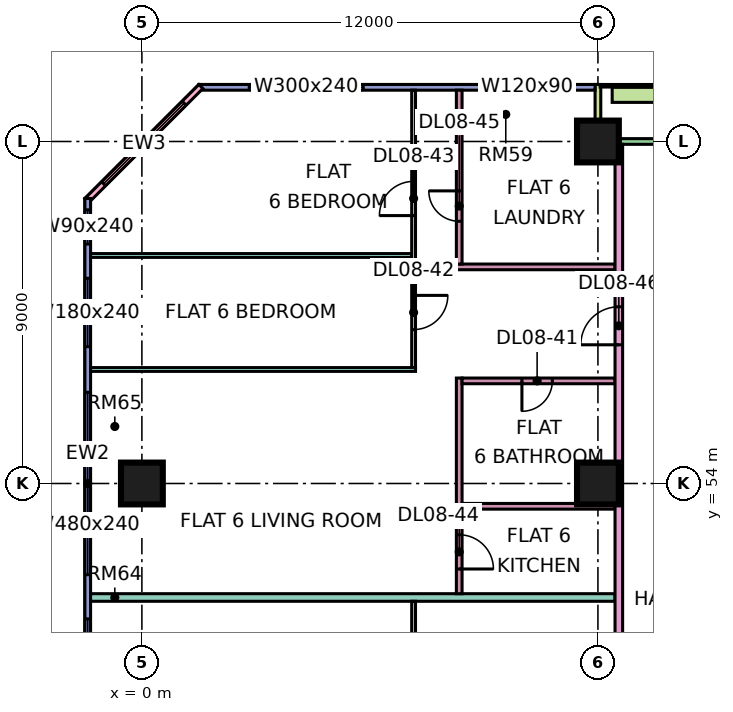
"""IFC4 building model, lengths in metres.
Left out: names, types, materials, properties, quantities, classifications, styles, units other than length and angle.
Written with IfcOpenShell. Run it as: python <this file> out.ifc"""

import sys

from ifc_helpers import new_model, si_unit, direction, frame, frame_2d, origin, origin_2d, place, context, subcontext, project, spatial, rectangle, extrude, element, fill, save


model = new_model("IFC4")
c1 = context("Model", 3, precision=1e-05, world=origin(), true_north=direction((0.0, 1.0)))
c2 = subcontext(c1, "Body", "Model", "MODEL_VIEW")
j1 = project(units=[si_unit("LENGTHUNIT", "METRE"), si_unit("PLANEANGLEUNIT", "RADIAN")], contexts=[c1])
p1 = place(None, origin())
s1 = spatial("IfcSite", under=j1, at=p1, CompositionType="ELEMENT")
p2 = place(p1, origin())
s2 = spatial("IfcBuilding", under=s1, at=p2, CompositionType="ELEMENT")
p3 = place(p2, frame((0.0, 0.0, 45.15)))
s3 = spatial("IfcBuildingStorey", under=s2, at=p3, CompositionType="ELEMENT", Elevation=45.15)
for number, where, z_axis, x_axis in (
    (1, (0.0, 54.0, 0.0), (0.0, 0.0, 1.0), (1.0, 0.0, 0.0)),
    (2, (12.0, 54.0, 0.0), (0.0, 0.0, 1.0), (1.0, 0.0, 0.0)),
    (3, (12.0, 63.0, 0.0), (0.0, 0.0, 1.0), (1.0, 0.0, 0.0)),
):
    element("IfcColumn", number, at=place(p3, frame(where, z_axis=z_axis, x_axis=x_axis)), inside=s3, PredefinedType="COLUMN", context=c2, shape_type="SweptSolid", body=[
        extrude(rectangle(XDim=1.1, YDim=1.1, at=origin_2d()), origin(), (0.0, 0.0, 1.0), 3.75),
    ])
p4 = place(p3, frame((22.425, 63.0, 0.0), z_axis=(0.0, 0.0, 1.0), x_axis=(-1.0, 0.0, 0.0)))
e4 = element("IfcWall", 4, at=p4, inside=s3, PredefinedType="SOLIDWALL", context=c2, shape_type="SweptSolid", body=[
    extrude(rectangle(XDim=10.35, YDim=0.15, at=frame_2d((5.175, 0.0))), origin(), (0.0, 0.0, 1.0), 3.35),
])
p5 = place(p4, frame((0.562, 0.0, 0.45)))
e5 = element("IfcOpeningElement", 5, at=p5, cuts=e4, PredefinedType="OPENING", context=c2, shape_type="SweptSolid", body=[
    extrude(rectangle(XDim=1.2, YDim=2.4, at=frame_2d((0.6, 1.2))), frame((0.0, 0.085, 0.0), z_axis=(0.0, -1.0, 0.0), x_axis=(1.0, 0.0, 0.0)), (0.0, 0.0, 1.0), 0.17),
])
p6 = place(p4, frame((3.975, 0.0, 0.45)))
e6 = element("IfcOpeningElement", 6, at=p6, cuts=e4, PredefinedType="OPENING", context=c2, shape_type="SweptSolid", body=[
    extrude(rectangle(XDim=2.4, YDim=2.4, at=frame_2d((1.2, 1.2))), frame((0.0, 0.085, 0.0), z_axis=(0.0, -1.0, 0.0), x_axis=(1.0, 0.0, 0.0)), (0.0, 0.0, 1.0), 0.17),
])
p7 = place(p3, frame((12.0, 64.5, 0.0), z_axis=(0.0, 0.0, 1.0), x_axis=(0.0, -1.0, 0.0)))
e7 = element("IfcWall", 7, at=p7, inside=s3, PredefinedType="SOLIDWALL", context=c2, shape_type="SweptSolid", body=[
    extrude(rectangle(XDim=1.5, YDim=0.15, at=frame_2d((0.75, 0.0))), origin(), (0.0, 0.0, 1.0), 3.35),
])
p8 = place(p3, frame((11.925, 64.425, 0.0), z_axis=(0.0, 0.0, 1.0), x_axis=(-1.0, 0.0, 0.0)))
e8 = element("IfcWall", 8, at=p8, inside=s3, PredefinedType="SOLIDWALL", context=c2, shape_type="SweptSolid", body=[
    extrude(rectangle(XDim=10.425, YDim=0.15, at=frame_2d((5.212, 0.0))), origin(), (0.0, 0.0, 1.0), 3.35),
])
p9 = place(p8, frame((1.188, 0.0, 1.7)))
e9 = element("IfcOpeningElement", 9, at=p9, cuts=e8, PredefinedType="OPENING", context=c2, shape_type="SweptSolid", body=[
    extrude(rectangle(XDim=1.2, YDim=0.9, at=frame_2d((0.6, 0.45))), frame((0.0, 0.085, 0.0), z_axis=(0.0, -1.0, 0.0), x_axis=(1.0, 0.0, 0.0)), (0.0, 0.0, 1.0), 0.17),
])
p10 = place(p8, frame((6.1, 0.0, 0.45)))
e10 = element("IfcOpeningElement", 10, at=p10, cuts=e8, PredefinedType="OPENING", context=c2, shape_type="SweptSolid", body=[
    extrude(rectangle(XDim=3.0, YDim=2.4, at=frame_2d((1.5, 1.2))), frame((0.0, 0.085, 0.0), z_axis=(0.0, -1.0, 0.0), x_axis=(1.0, 0.0, 0.0)), (0.0, 0.0, 1.0), 0.17),
])
p11 = place(p3, frame((1.553, 64.447, 0.0), z_axis=(0.0, 0.0, 1.0), x_axis=(-0.707106781187, -0.707106781187, 0.0)))
e11 = element("IfcWall", 11, at=p11, inside=s3, PredefinedType="SOLIDWALL", context=c2, shape_type="SweptSolid", body=[
    extrude(rectangle(XDim=4.243, YDim=0.15, at=frame_2d((2.121, 0.0))), origin(), (0.0, 0.0, 1.0), 3.35),
])
p12 = place(p11, frame((0.621, 0.0, 0.45)))
e12 = element("IfcOpeningElement", 12, at=p12, cuts=e11, PredefinedType="OPENING", context=c2, shape_type="SweptSolid", body=[
    extrude(rectangle(XDim=3.0, YDim=2.4, at=frame_2d((1.5, 1.2))), frame((0.0, 0.085, 0.0), z_axis=(0.0, -1.0, 0.0), x_axis=(1.0, 0.0, 0.0)), (0.0, 0.0, 1.0), 0.17),
])
p13 = place(p3, frame((-1.425, 61.5, 0.0), z_axis=(0.0, 0.0, 1.0), x_axis=(0.0, -1.0, 0.0)))
e13 = element("IfcWall", 13, at=p13, inside=s3, PredefinedType="SOLIDWALL", context=c2, shape_type="SweptSolid", body=[
    extrude(rectangle(XDim=13.425, YDim=0.15, at=frame_2d((6.712, 0.0))), origin(), (0.0, 0.0, 1.0), 3.35),
])
p14 = place(p13, frame((0.3, 0.0, 0.45)))
e14 = element("IfcOpeningElement", 14, at=p14, cuts=e13, PredefinedType="OPENING", context=c2, shape_type="SweptSolid", body=[
    extrude(rectangle(XDim=0.9, YDim=2.4, at=frame_2d((0.45, 1.2))), frame((0.0, 0.085, 0.0), z_axis=(0.0, -1.0, 0.0), x_axis=(1.0, 0.0, 0.0)), (0.0, 0.0, 1.0), 0.17),
])
p15 = place(p13, frame((2.1, 0.0, 0.45)))
e15 = element("IfcOpeningElement", 15, at=p15, cuts=e13, PredefinedType="OPENING", context=c2, shape_type="SweptSolid", body=[
    extrude(rectangle(XDim=1.8, YDim=2.4, at=frame_2d((0.9, 1.2))), frame((0.0, 0.085, 0.0), z_axis=(0.0, -1.0, 0.0), x_axis=(1.0, 0.0, 0.0)), (0.0, 0.0, 1.0), 0.17),
])
p16 = place(p13, frame((5.1, 0.0, 0.45)))
e16 = element("IfcOpeningElement", 16, at=p16, cuts=e13, PredefinedType="OPENING", context=c2, shape_type="SweptSolid", body=[
    extrude(rectangle(XDim=4.8, YDim=2.4, at=frame_2d((2.4, 1.2))), frame((0.0, 0.085, 0.0), z_axis=(0.0, -1.0, 0.0), x_axis=(1.0, 0.0, 0.0)), (0.0, 0.0, 1.0), 0.17),
])
p17 = place(p13, frame((11.062, 0.0, 0.45)))
e17 = element("IfcOpeningElement", 17, at=p17, cuts=e13, PredefinedType="OPENING", context=c2, shape_type="SweptSolid", body=[
    extrude(rectangle(XDim=1.8, YDim=2.4, at=frame_2d((0.9, 1.2))), frame((0.0, 0.085, 0.0), z_axis=(0.0, -1.0, 0.0), x_axis=(1.0, 0.0, 0.0)), (0.0, 0.0, 1.0), 0.17),
])
p18 = place(p3, frame((22.125, 64.229, 0.0), z_axis=(0.0, 0.0, 1.0), x_axis=(-1.0, 0.0, 0.0)))
e18 = element("IfcWall", 18, at=p18, inside=s3, PredefinedType="SOLIDWALL", context=c2, shape_type="SweptSolid", body=[
    extrude(rectangle(XDim=9.75, YDim=0.4, at=frame_2d((4.875, 0.0))), origin(), (0.0, 0.0, 1.0), 0.7),
])
p19 = place(p3, frame((-1.351, 60.0, 0.0), z_axis=(0.0, 0.0, 1.0), x_axis=(1.0, 0.0, 0.0)))
e19 = element("IfcWall", 19, at=p19, inside=s3, PredefinedType="PARTITIONING", context=c2, shape_type="SweptSolid", body=[
    extrude(rectangle(XDim=8.451, YDim=0.1, at=frame_2d((4.226, 0.0))), origin(), (0.0, 0.0, 1.0), 3.35),
])
p20 = place(p3, frame((-1.35, 51.0, 0.0), z_axis=(0.0, 0.0, 1.0), x_axis=(1.0, 0.0, 0.0)))
e20 = element("IfcWall", 20, at=p20, inside=s3, PredefinedType="PARTITIONING", context=c2, shape_type="SweptSolid", body=[
    extrude(rectangle(XDim=13.8, YDim=0.2, at=frame_2d((6.9, 0.0))), origin(), (0.0, 0.0, 1.0), 3.35),
])
p21 = place(p3, frame((-1.35, 57.0, 0.0), z_axis=(0.0, 0.0, 1.0), x_axis=(1.0, 0.0, 0.0)))
e21 = element("IfcWall", 21, at=p21, inside=s3, PredefinedType="PARTITIONING", context=c2, shape_type="SweptSolid", body=[
    extrude(rectangle(XDim=8.55, YDim=0.1, at=frame_2d((4.275, 0.0))), origin(), (0.0, 0.0, 1.0), 3.35),
])
p22 = place(p3, frame((7.15, 47.45, 0.0), z_axis=(0.0, 0.0, 1.0), x_axis=(0.0, 1.0, 0.0)))
e22 = element("IfcWall", 22, at=p22, inside=s3, PredefinedType="PARTITIONING", context=c2, shape_type="SweptSolid", body=[
    extrude(rectangle(XDim=3.45, YDim=0.1, at=frame_2d((1.725, 0.0))), origin(), (0.0, 0.0, 1.0), 3.35),
])
p23 = place(p3, frame((7.15, 57.05, 0.0), z_axis=(0.0, 0.0, 1.0), x_axis=(0.0, 1.0, 0.0)))
e23 = element("IfcWall", 23, at=p23, inside=s3, PredefinedType="PARTITIONING", context=c2, shape_type="SweptSolid", body=[
    extrude(rectangle(XDim=7.3, YDim=0.1, at=frame_2d((3.65, 0.0))), origin(), (0.0, 0.0, 1.0), 3.35),
])
p24 = place(p23, frame((1.0, 0.0, 0.0)))
e24 = element("IfcOpeningElement", 24, at=p24, cuts=e23, PredefinedType="OPENING", context=c2, shape_type="SweptSolid", body=[
    extrude(rectangle(XDim=0.9, YDim=2.1, at=frame_2d((0.45, 1.05))), frame((0.0, 0.06, 0.0), z_axis=(0.0, -1.0, 0.0), x_axis=(1.0, 0.0, 0.0)), (0.0, 0.0, 1.0), 0.12),
])
p25 = place(p23, frame((4.0, 0.0, 0.0)))
e25 = element("IfcOpeningElement", 25, at=p25, cuts=e23, PredefinedType="OPENING", context=c2, shape_type="SweptSolid", body=[
    extrude(rectangle(XDim=0.9, YDim=2.1, at=frame_2d((0.45, 1.05))), frame((0.0, 0.06, 0.0), z_axis=(0.0, -1.0, 0.0), x_axis=(1.0, 0.0, 0.0)), (0.0, 0.0, 1.0), 0.12),
])
p26 = place(p3, frame((8.275, 59.7, 0.0), z_axis=(0.0, 0.0, 1.0), x_axis=(1.0, 0.0, 0.0)))
e26 = element("IfcWall", 26, at=p26, inside=s3, PredefinedType="PARTITIONING", context=c2, shape_type="SweptSolid", body=[
    extrude(rectangle(XDim=4.175, YDim=0.15, at=frame_2d((2.087, 0.0))), origin(), (0.0, 0.0, 1.0), 3.35),
])
p27 = place(p3, frame((8.35, 51.1, 0.0), z_axis=(0.0, 0.0, 1.0), x_axis=(0.0, 1.0, 0.0)))
e27 = element("IfcWall", 27, at=p27, inside=s3, PredefinedType="PARTITIONING", context=c2, shape_type="SweptSolid", body=[
    extrude(rectangle(XDim=5.675, YDim=0.15, at=frame_2d((2.837, 0.0))), origin(), (0.0, 0.0, 1.0), 3.35),
])
p28 = place(p27, frame((0.65, 0.0, 0.0)))
e28 = element("IfcOpeningElement", 28, at=p28, cuts=e27, PredefinedType="OPENING", context=c2, shape_type="SweptSolid", body=[
    extrude(rectangle(XDim=0.9, YDim=2.1, at=frame_2d((0.45, 1.05))), frame((0.0, 0.085, 0.0), z_axis=(0.0, -1.0, 0.0), x_axis=(1.0, 0.0, 0.0)), (0.0, 0.0, 1.0), 0.17),
])
p29 = place(p3, frame((8.35, 59.775, 0.0), z_axis=(0.0, 0.0, 1.0), x_axis=(0.0, 1.0, 0.0)))
e29 = element("IfcWall", 29, at=p29, inside=s3, PredefinedType="PARTITIONING", context=c2, shape_type="SweptSolid", body=[
    extrude(rectangle(XDim=4.575, YDim=0.15, at=frame_2d((2.288, 0.0))), origin(), (0.0, 0.0, 1.0), 3.35),
])
p30 = place(p29, frame((1.125, 0.0, 0.0)))
e30 = element("IfcOpeningElement", 30, at=p30, cuts=e29, PredefinedType="OPENING", context=c2, shape_type="SweptSolid", body=[
    extrude(rectangle(XDim=0.8, YDim=2.1, at=frame_2d((0.4, 1.05))), frame((0.0, 0.085, 0.0), z_axis=(0.0, -1.0, 0.0), x_axis=(1.0, 0.0, 0.0)), (0.0, 0.0, 1.0), 0.17),
])
p31 = place(p3, frame((8.425, 53.4, 0.0), z_axis=(0.0, 0.0, 1.0), x_axis=(1.0, 0.0, 0.0)))
e31 = element("IfcWall", 31, at=p31, inside=s3, PredefinedType="PARTITIONING", context=c2, shape_type="SweptSolid", body=[
    extrude(rectangle(XDim=4.025, YDim=0.15, at=frame_2d((2.012, 0.0))), origin(), (0.0, 0.0, 1.0), 3.35),
])
p32 = place(p3, frame((8.425, 56.7, 0.0), z_axis=(0.0, 0.0, 1.0), x_axis=(1.0, 0.0, 0.0)))
e32 = element("IfcWall", 32, at=p32, inside=s3, PredefinedType="PARTITIONING", context=c2, shape_type="SweptSolid", body=[
    extrude(rectangle(XDim=4.025, YDim=0.15, at=frame_2d((2.012, 0.0))), origin(), (0.0, 0.0, 1.0), 3.35),
])
p33 = place(p32, frame((1.575, 0.0, 0.0)))
e33 = element("IfcOpeningElement", 33, at=p33, cuts=e32, PredefinedType="OPENING", context=c2, shape_type="SweptSolid", body=[
    extrude(rectangle(XDim=0.8, YDim=2.1, at=frame_2d((0.4, 1.05))), frame((0.0, 0.085, 0.0), z_axis=(0.0, -1.0, 0.0), x_axis=(1.0, 0.0, 0.0)), (0.0, 0.0, 1.0), 0.17),
])
p34 = place(p3, frame((12.55, 20.0, 0.0), z_axis=(0.0, 0.0, 1.0), x_axis=(0.0, 1.0, 0.0)))
e34 = element("IfcWall", 34, at=p34, inside=s3, PredefinedType="PARTITIONING", context=c2, shape_type="SweptSolid", body=[
    extrude(rectangle(XDim=42.926, YDim=0.2, at=frame_2d((21.463, 0.0))), origin(), (0.0, 0.0, 1.0), 3.35),
])
p35 = place(p34, frame((25.8, 0.0, 0.0)))
e35 = element("IfcOpeningElement", 35, at=p35, cuts=e34, PredefinedType="OPENING", context=c2, shape_type="SweptSolid", body=[
    extrude(rectangle(XDim=1.0, YDim=2.1, at=frame_2d((0.5, 1.05))), frame((0.0, 0.11, 0.0), z_axis=(0.0, -1.0, 0.0), x_axis=(1.0, 0.0, 0.0)), (0.0, 0.0, 1.0), 0.22),
])
p36 = place(p34, frame((37.65, 0.0, 0.0)))
e36 = element("IfcOpeningElement", 36, at=p36, cuts=e34, PredefinedType="OPENING", context=c2, shape_type="SweptSolid", body=[
    extrude(rectangle(XDim=1.0, YDim=2.1, at=frame_2d((0.5, 1.05))), frame((0.0, 0.11, 0.0), z_axis=(0.0, -1.0, 0.0), x_axis=(1.0, 0.0, 0.0)), (0.0, 0.0, 1.0), 0.22),
])
p37 = place(p34, frame((0.6, 0.0, 0.0)))
e37 = element("IfcOpeningElement", 37, at=p37, cuts=e34, PredefinedType="OPENING", context=c2, shape_type="SweptSolid", body=[
    extrude(rectangle(XDim=1.2, YDim=2.1, at=frame_2d((0.6, 1.05))), frame((0.0, 0.11, 0.0), z_axis=(0.0, -1.0, 0.0), x_axis=(1.0, 0.0, 0.0)), (0.0, 0.0, 1.0), 0.22),
])
p38 = place(p34, frame((4.65, 0.0, 0.0)))
e38 = element("IfcOpeningElement", 38, at=p38, cuts=e34, PredefinedType="OPENING", context=c2, shape_type="SweptSolid", body=[
    extrude(rectangle(XDim=1.0, YDim=2.1, at=frame_2d((0.5, 1.05))), frame((0.0, 0.11, 0.0), z_axis=(0.0, -1.0, 0.0), x_axis=(1.0, 0.0, 0.0)), (0.0, 0.0, 1.0), 0.22),
])
p39 = place(p9, origin())
e39 = element("IfcWindow", 39, at=p39, inside=s3, PartitioningType="SINGLE_PANEL", PredefinedType="WINDOW", context=c2, shape_type="SweptSolid", body=[
    extrude(rectangle(XDim=1.2, YDim=0.9, at=frame_2d((0.6, 0.45))), frame((0.0, 0.03, 0.0), z_axis=(0.0, -1.0, 0.0), x_axis=(1.0, 0.0, 0.0)), (0.0, 0.0, 1.0), 0.06),
])
fill(e9, e39)
p40 = place(p10, origin())
e40 = element("IfcWindow", 40, at=p40, inside=s3, PartitioningType="SINGLE_PANEL", PredefinedType="WINDOW", context=c2, shape_type="SweptSolid", body=[
    extrude(rectangle(XDim=3.0, YDim=2.4, at=frame_2d((1.5, 1.2))), frame((0.0, 0.03, 0.0), z_axis=(0.0, -1.0, 0.0), x_axis=(1.0, 0.0, 0.0)), (0.0, 0.0, 1.0), 0.06),
])
fill(e10, e40)
p41 = place(p12, origin())
e41 = element("IfcWindow", 41, at=p41, inside=s3, PartitioningType="SINGLE_PANEL", PredefinedType="WINDOW", context=c2, shape_type="SweptSolid", body=[
    extrude(rectangle(XDim=3.0, YDim=2.4, at=frame_2d((1.5, 1.2))), frame((0.0, 0.03, 0.0), z_axis=(0.0, -1.0, 0.0), x_axis=(1.0, 0.0, 0.0)), (0.0, 0.0, 1.0), 0.06),
])
fill(e12, e41)
p42 = place(p14, origin())
e42 = element("IfcWindow", 42, at=p42, inside=s3, PartitioningType="SINGLE_PANEL", PredefinedType="WINDOW", context=c2, shape_type="SweptSolid", body=[
    extrude(rectangle(XDim=0.9, YDim=2.4, at=frame_2d((0.45, 1.2))), frame((0.0, 0.03, 0.0), z_axis=(0.0, -1.0, 0.0), x_axis=(1.0, 0.0, 0.0)), (0.0, 0.0, 1.0), 0.06),
])
fill(e14, e42)
p43 = place(p15, origin())
e43 = element("IfcWindow", 43, at=p43, inside=s3, PartitioningType="SINGLE_PANEL", PredefinedType="WINDOW", context=c2, shape_type="SweptSolid", body=[
    extrude(rectangle(XDim=1.8, YDim=2.4, at=frame_2d((0.9, 1.2))), frame((0.0, 0.03, 0.0), z_axis=(0.0, -1.0, 0.0), x_axis=(1.0, 0.0, 0.0)), (0.0, 0.0, 1.0), 0.06),
])
fill(e15, e43)
p44 = place(p16, origin())
e44 = element("IfcWindow", 44, at=p44, inside=s3, PartitioningType="SINGLE_PANEL", PredefinedType="WINDOW", context=c2, shape_type="SweptSolid", body=[
    extrude(rectangle(XDim=4.8, YDim=2.4, at=frame_2d((2.4, 1.2))), frame((0.0, 0.03, 0.0), z_axis=(0.0, -1.0, 0.0), x_axis=(1.0, 0.0, 0.0)), (0.0, 0.0, 1.0), 0.06),
])
fill(e16, e44)
p45 = place(p17, origin())
e45 = element("IfcWindow", 45, at=p45, inside=s3, PartitioningType="SINGLE_PANEL", PredefinedType="WINDOW", context=c2, shape_type="SweptSolid", body=[
    extrude(rectangle(XDim=1.8, YDim=2.4, at=frame_2d((0.9, 1.2))), frame((0.0, 0.03, 0.0), z_axis=(0.0, -1.0, 0.0), x_axis=(1.0, 0.0, 0.0)), (0.0, 0.0, 1.0), 0.06),
])
fill(e17, e45)
p46 = place(p33, frame((0.8, 0.0, 0.0), z_axis=(0.0, 0.0, 1.0), x_axis=(-1.0, 0.0, 0.0)))
e46 = element("IfcDoor", 46, at=p46, inside=s3, OperationType="SINGLE_SWING_LEFT", PredefinedType="DOOR", context=c2, shape_type="SweptSolid", body=[
    extrude(rectangle(XDim=0.8, YDim=2.1, at=frame_2d((0.4, 1.05))), frame((0.0, 0.025, 0.0), z_axis=(0.0, -1.0, 0.0), x_axis=(1.0, 0.0, 0.0)), (0.0, 0.0, 1.0), 0.05),
])
fill(e33, e46)
p47 = place(p24, origin())
e47 = element("IfcDoor", 47, at=p47, inside=s3, OperationType="SINGLE_SWING_RIGHT", PredefinedType="DOOR", context=c2, shape_type="SweptSolid", body=[
    extrude(rectangle(XDim=0.9, YDim=2.1, at=frame_2d((0.45, 1.05))), frame((0.0, 0.025, 0.0), z_axis=(0.0, -1.0, 0.0), x_axis=(1.0, 0.0, 0.0)), (0.0, 0.0, 1.0), 0.05),
])
fill(e24, e47)
p48 = place(p25, origin())
e48 = element("IfcDoor", 48, at=p48, inside=s3, OperationType="SINGLE_SWING_LEFT", PredefinedType="DOOR", context=c2, shape_type="SweptSolid", body=[
    extrude(rectangle(XDim=0.9, YDim=2.1, at=frame_2d((0.45, 1.05))), frame((0.0, 0.025, 0.0), z_axis=(0.0, -1.0, 0.0), x_axis=(1.0, 0.0, 0.0)), (0.0, 0.0, 1.0), 0.05),
])
fill(e25, e48)
p49 = place(p28, frame((0.9, 0.0, 0.0), z_axis=(0.0, 0.0, 1.0), x_axis=(-1.0, 0.0, 0.0)))
e49 = element("IfcDoor", 49, at=p49, inside=s3, OperationType="SINGLE_SWING_LEFT", PredefinedType="DOOR", context=c2, shape_type="SweptSolid", body=[
    extrude(rectangle(XDim=0.9, YDim=2.1, at=frame_2d((0.45, 1.05))), frame((0.0, 0.025, 0.0), z_axis=(0.0, -1.0, 0.0), x_axis=(1.0, 0.0, 0.0)), (0.0, 0.0, 1.0), 0.05),
])
fill(e28, e49)
p50 = place(p30, frame((0.8, 0.0, 0.0), z_axis=(0.0, 0.0, 1.0), x_axis=(-1.0, 0.0, 0.0)))
e50 = element("IfcDoor", 50, at=p50, inside=s3, OperationType="SINGLE_SWING_RIGHT", PredefinedType="DOOR", context=c2, shape_type="SweptSolid", body=[
    extrude(rectangle(XDim=0.8, YDim=2.1, at=frame_2d((0.4, 1.05))), frame((0.0, 0.025, 0.0), z_axis=(0.0, -1.0, 0.0), x_axis=(1.0, 0.0, 0.0)), (0.0, 0.0, 1.0), 0.05),
])
fill(e30, e50)
p51 = place(p36, origin())
e51 = element("IfcDoor", 51, at=p51, inside=s3, OperationType="SINGLE_SWING_LEFT", PredefinedType="DOOR", context=c2, shape_type="SweptSolid", body=[
    extrude(rectangle(XDim=1.0, YDim=2.1, at=frame_2d((0.5, 1.05))), frame((0.0, 0.025, 0.0), z_axis=(0.0, -1.0, 0.0), x_axis=(1.0, 0.0, 0.0)), (0.0, 0.0, 1.0), 0.05),
])
fill(e36, e51)
save(model, sys.argv[1])
